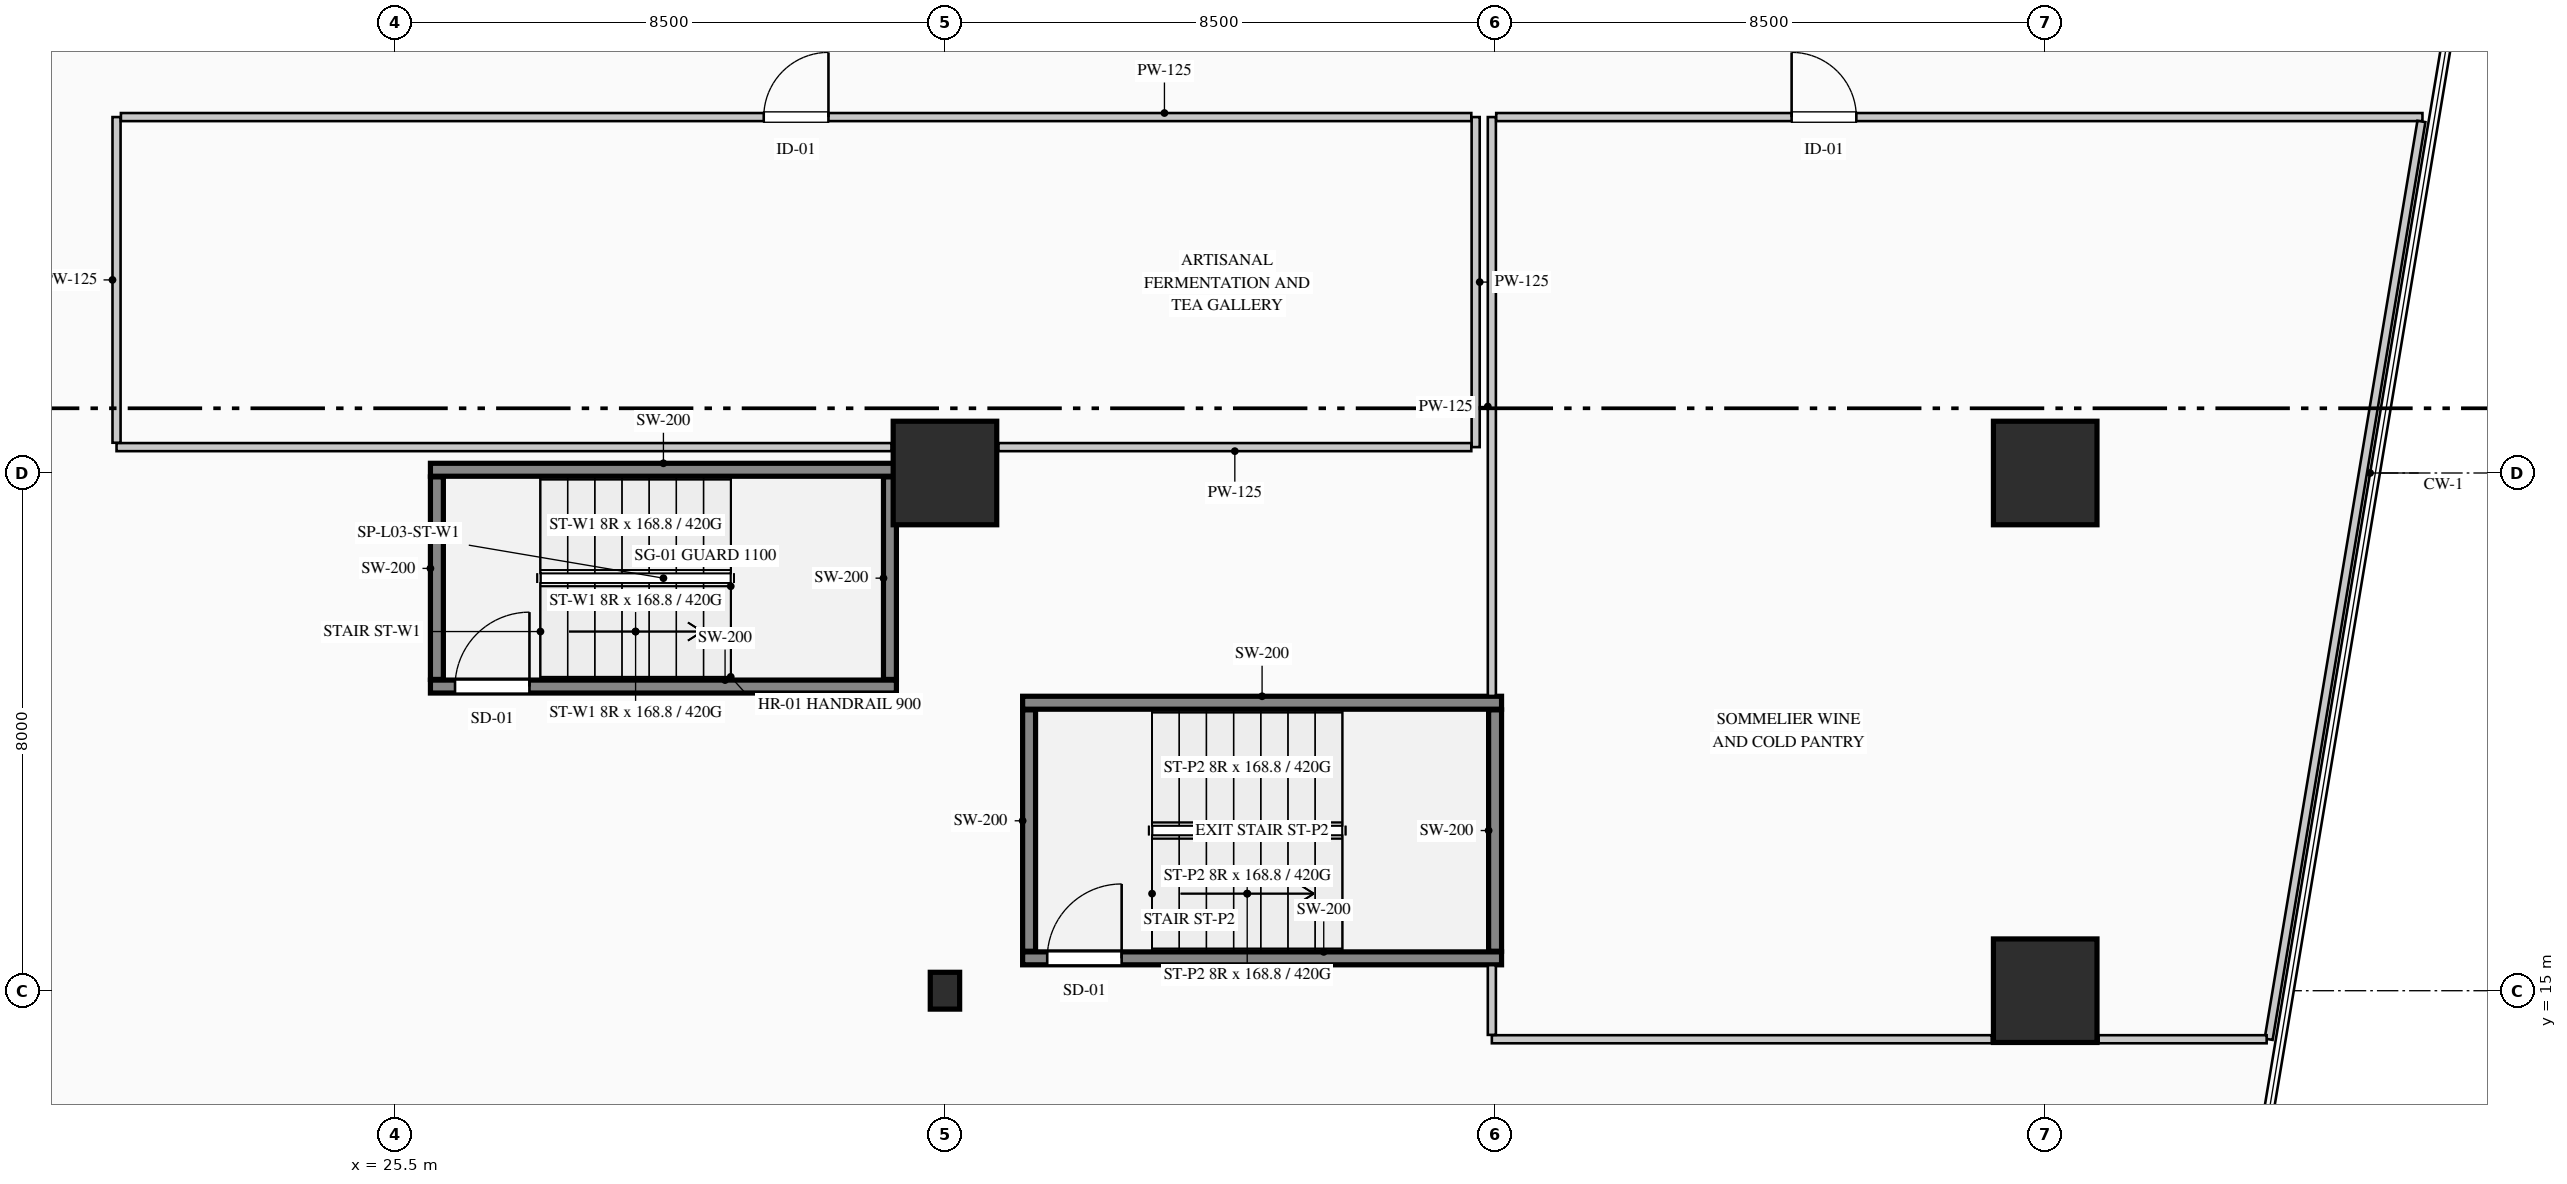
"""IFC4 building model, lengths in metres.
Left out: names, types, materials, properties, quantities, classifications, styles, units other than length and angle.
Written with IfcOpenShell. Run it as: python <this file> out.ifc"""

import sys

from ifc_helpers import new_model, si_unit, direction, frame, frame_2d, origin, origin_2d, place, context, subcontext, project, spatial, rectangle, i_section, extrude, element, fill, save


model = new_model("IFC4")
c1 = context("Model", 3, precision=1e-05, world=origin(), true_north=direction((0.0, 1.0)))
c2 = subcontext(c1, "Body", "Model", "MODEL_VIEW")
j1 = project(units=[si_unit("LENGTHUNIT", "METRE"), si_unit("PLANEANGLEUNIT", "RADIAN")], contexts=[c1])
p1 = place(None, origin())
s1 = spatial("IfcSite", under=j1, at=p1, CompositionType="ELEMENT")
p2 = place(p1, origin())
s2 = spatial("IfcBuilding", under=s1, at=p2, CompositionType="ELEMENT")
p3 = place(p2, frame((0.0, 0.0, 10.8)))
s3 = spatial("IfcBuildingStorey", under=s2, at=p3, CompositionType="ELEMENT", Elevation=10.8)
p4 = place(p3, frame((26.05, 19.7, 0.0), z_axis=(0.0, 0.0, 1.0), x_axis=(1.0, 0.0, 0.0)))
e1 = element("IfcWall", 1, at=p4, inside=s3, PredefinedType="SHEAR", context=c2, shape_type="SweptSolid", body=[
    extrude(rectangle(XDim=7.2, YDim=0.2, at=frame_2d((3.6, 0.0))), origin(), (0.0, 0.0, 1.0), 5.4),
])
p5 = place(p4, frame((0.38, 0.0, 0.0)))
e2 = element("IfcOpeningElement", 2, at=p5, cuts=e1, PredefinedType="OPENING", context=c2, shape_type="SweptSolid", body=[
    extrude(rectangle(XDim=1.15, YDim=2.2, at=frame_2d((0.575, 1.1))), frame((0.0, 0.11, 0.0), z_axis=(0.0, -1.0, 0.0), x_axis=(1.0, 0.0, 0.0)), (0.0, 0.0, 1.0), 0.22),
])
p6 = place(p3, frame((26.05, 23.05, 0.0), z_axis=(0.0, 0.0, 1.0), x_axis=(1.0, 0.0, 0.0)))
e3 = element("IfcWall", 3, at=p6, inside=s3, PredefinedType="SHEAR", context=c2, shape_type="SweptSolid", body=[
    extrude(rectangle(XDim=7.2, YDim=0.2, at=frame_2d((3.6, 0.0))), origin(), (0.0, 0.0, 1.0), 5.4),
])
for number, where, z_axis, x_axis in (
    (4, (26.15, 19.81, 0.0), (0.0, 0.0, 1.0), (0.0, 1.0, 0.0)),
    (5, (33.15, 19.81, 0.0), (0.0, 0.0, 1.0), (0.0, 1.0, 0.0)),
):
    element("IfcWall", number, at=place(p3, frame(where, z_axis=z_axis, x_axis=x_axis)), inside=s3, PredefinedType="SHEAR", context=c2, shape_type="SweptSolid", body=[
        extrude(rectangle(XDim=3.13, YDim=0.2, at=frame_2d((1.565, 0.0))), origin(), (0.0, 0.0, 1.0), 5.4),
    ])
p7 = place(p3, frame((35.2, 15.5, 0.0), z_axis=(0.0, 0.0, 1.0), x_axis=(1.0, 0.0, 0.0)))
e6 = element("IfcWall", 6, at=p7, inside=s3, PredefinedType="SHEAR", context=c2, shape_type="SweptSolid", body=[
    extrude(rectangle(XDim=7.4, YDim=0.2, at=frame_2d((3.7, 0.0))), origin(), (0.0, 0.0, 1.0), 5.4),
])
p8 = place(p7, frame((0.38, 0.0, 0.0)))
e7 = element("IfcOpeningElement", 7, at=p8, cuts=e6, PredefinedType="OPENING", context=c2, shape_type="SweptSolid", body=[
    extrude(rectangle(XDim=1.15, YDim=2.2, at=frame_2d((0.575, 1.1))), frame((0.0, 0.11, 0.0), z_axis=(0.0, -1.0, 0.0), x_axis=(1.0, 0.0, 0.0)), (0.0, 0.0, 1.0), 0.22),
])
p9 = place(p3, frame((35.2, 19.45, 0.0), z_axis=(0.0, 0.0, 1.0), x_axis=(1.0, 0.0, 0.0)))
e8 = element("IfcWall", 8, at=p9, inside=s3, PredefinedType="SHEAR", context=c2, shape_type="SweptSolid", body=[
    extrude(rectangle(XDim=7.4, YDim=0.2, at=frame_2d((3.7, 0.0))), origin(), (0.0, 0.0, 1.0), 5.4),
])
for number, where, z_axis, x_axis in (
    (9, (35.3, 15.61, 0.0), (0.0, 0.0, 1.0), (0.0, 1.0, 0.0)),
    (10, (42.5, 15.61, 0.0), (0.0, 0.0, 1.0), (0.0, 1.0, 0.0)),
):
    element("IfcWall", number, at=place(p3, frame(where, z_axis=z_axis, x_axis=x_axis)), inside=s3, PredefinedType="SHEAR", context=c2, shape_type="SweptSolid", body=[
        extrude(rectangle(XDim=3.73, YDim=0.2, at=frame_2d((1.865, 0.0))), origin(), (0.0, 0.0, 1.0), 5.4),
    ])
p10 = place(p3, frame((34.0, 15.0, 0.0), z_axis=(0.0, 0.0, 1.0), x_axis=(1.0, 0.0, 0.0)))
e11 = element("IfcColumn", 11, at=p10, inside=s3, PredefinedType="COLUMN", context=c2, shape_type="SweptSolid", body=[
    extrude(i_section(OverallWidth=0.454, OverallDepth=0.569, WebThickness=0.078, FlangeThickness=0.08, FilletRadius=0.015, at=origin_2d()), origin(), (0.0, 0.0, 1.0), 5.4),
])
for number, where, z_axis, x_axis in (
    (12, (34.0, 23.0, 0.0), (0.0, 0.0, 1.0), (1.0, 0.0, 0.0)),
    (13, (51.0, 15.0, 0.0), (0.0, 0.0, 1.0), (1.0, 0.0, 0.0)),
    (14, (51.0, 23.0, 0.0), (0.0, 0.0, 1.0), (1.0, 0.0, 0.0)),
):
    element("IfcColumn", number, at=place(p3, frame(where, z_axis=z_axis, x_axis=x_axis)), inside=s3, PredefinedType="COLUMN", context=c2, shape_type="SweptSolid", body=[
        extrude(rectangle(XDim=1.6, YDim=1.6, at=origin_2d()), origin(), (0.0, 0.0, 1.0), 5.4),
    ])
p11 = place(p3, frame((42.2, 28.5, 0.0), z_axis=(0.0, 0.0, 1.0), x_axis=(0.0, -1.0, 0.0)))
e15 = element("IfcWall", 15, at=p11, inside=s3, PredefinedType="PARTITIONING", context=c2, shape_type="SweptSolid", body=[
    extrude(rectangle(XDim=5.1, YDim=0.125, at=frame_2d((2.55, 0.0))), origin(), (0.0, 0.0, 1.0), 5.08),
])
p12 = place(p3, frame((42.133, 23.4, 0.0), z_axis=(0.0, 0.0, 1.0), x_axis=(-1.0, 0.0, 0.0)))
e16 = element("IfcWall", 16, at=p12, inside=s3, PredefinedType="PARTITIONING", context=c2, shape_type="SweptSolid", body=[
    extrude(rectangle(XDim=7.308, YDim=0.125, at=frame_2d((3.654, 0.0))), origin(), (0.0, 0.0, 1.0), 5.08),
])
p13 = place(p3, frame((33.175, 23.4, 0.0), z_axis=(0.0, 0.0, 1.0), x_axis=(-1.0, 0.0, 0.0)))
e17 = element("IfcWall", 17, at=p13, inside=s3, PredefinedType="PARTITIONING", context=c2, shape_type="SweptSolid", body=[
    extrude(rectangle(XDim=11.975, YDim=0.125, at=frame_2d((5.988, 0.0))), origin(), (0.0, 0.0, 1.0), 5.08),
])
p14 = place(p3, frame((21.2, 23.468, 0.0), z_axis=(0.0, 0.0, 1.0), x_axis=(0.0, 1.0, 0.0)))
e18 = element("IfcWall", 18, at=p14, inside=s3, PredefinedType="PARTITIONING", context=c2, shape_type="SweptSolid", body=[
    extrude(rectangle(XDim=5.032, YDim=0.125, at=frame_2d((2.516, 0.0))), origin(), (0.0, 0.0, 1.0), 5.08),
])
p15 = place(p3, frame((21.268, 28.5, 0.0), z_axis=(0.0, 0.0, 1.0), x_axis=(1.0, 0.0, 0.0)))
e19 = element("IfcWall", 19, at=p15, inside=s3, PredefinedType="PARTITIONING", context=c2, shape_type="SweptSolid", body=[
    extrude(rectangle(XDim=20.865, YDim=0.125, at=frame_2d((10.433, 0.0))), origin(), (0.0, 0.0, 1.0), 5.08),
])
p16 = place(p15, frame((9.933, 0.0, 0.0)))
e20 = element("IfcOpeningElement", 20, at=p16, cuts=e19, PredefinedType="OPENING", context=c2, shape_type="SweptSolid", body=[
    extrude(rectangle(XDim=1.0, YDim=2.15, at=frame_2d((0.5, 1.075))), frame((0.0, 0.073, 0.0), z_axis=(0.0, -1.0, 0.0), x_axis=(1.0, 0.0, 0.0)), (0.0, 0.0, 1.0), 0.145),
])
p17 = place(p3, frame((42.45, 19.555, 0.0), z_axis=(0.0, 0.0, 1.0), x_axis=(0.0, 1.0, 0.0)))
e21 = element("IfcWall", 21, at=p17, inside=s3, PredefinedType="PARTITIONING", context=c2, shape_type="SweptSolid", body=[
    extrude(rectangle(XDim=8.945, YDim=0.125, at=frame_2d((4.473, 0.0))), origin(), (0.0, 0.0, 1.0), 5.08),
])
p18 = place(p3, frame((42.518, 28.5, 0.0), z_axis=(0.0, 0.0, 1.0), x_axis=(1.0, 0.0, 0.0)))
e22 = element("IfcWall", 22, at=p18, inside=s3, PredefinedType="PARTITIONING", context=c2, shape_type="SweptSolid", body=[
    extrude(rectangle(XDim=14.311, YDim=0.125, at=frame_2d((7.156, 0.0))), origin(), (0.0, 0.0, 1.0), 5.08),
])
p19 = place(p18, frame((4.564, 0.0, 0.0)))
e23 = element("IfcOpeningElement", 23, at=p19, cuts=e22, PredefinedType="OPENING", context=c2, shape_type="SweptSolid", body=[
    extrude(rectangle(XDim=1.0, YDim=2.15, at=frame_2d((0.5, 1.075))), frame((0.0, 0.073, 0.0), z_axis=(0.0, -1.0, 0.0), x_axis=(1.0, 0.0, 0.0)), (0.0, 0.0, 1.0), 0.145),
])
p20 = place(p3, frame((56.813, 28.433, 0.0), z_axis=(0.0, 0.0, 1.0), x_axis=(-0.16420072603, -0.9864269469, 0.0)))
e24 = element("IfcWall", 24, at=p20, inside=s3, PredefinedType="PARTITIONING", context=c2, shape_type="SweptSolid", body=[
    extrude(rectangle(XDim=14.378, YDim=0.125, at=frame_2d((7.189, 0.0))), origin(), (0.0, 0.0, 1.0), 5.08),
])
p21 = place(p3, frame((54.421, 14.25, 0.0), z_axis=(0.0, 0.0, 1.0), x_axis=(-1.0, 0.0, 0.0)))
e25 = element("IfcWall", 25, at=p21, inside=s3, PredefinedType="PARTITIONING", context=c2, shape_type="SweptSolid", body=[
    extrude(rectangle(XDim=2.596, YDim=0.125, at=frame_2d((1.298, 0.0))), origin(), (0.0, 0.0, 1.0), 5.08),
])
p22 = place(p3, frame((50.175, 14.25, 0.0), z_axis=(0.0, 0.0, 1.0), x_axis=(-1.0, 0.0, 0.0)))
e26 = element("IfcWall", 26, at=p22, inside=s3, PredefinedType="PARTITIONING", context=c2, shape_type="SweptSolid", body=[
    extrude(rectangle(XDim=7.725, YDim=0.125, at=frame_2d((3.863, 0.0))), origin(), (0.0, 0.0, 1.0), 5.08),
])
p23 = place(p3, frame((42.45, 14.317, 0.0), z_axis=(0.0, 0.0, 1.0), x_axis=(0.0, 1.0, 0.0)))
e27 = element("IfcWall", 27, at=p23, inside=s3, PredefinedType="PARTITIONING", context=c2, shape_type="SweptSolid", body=[
    extrude(rectangle(XDim=1.078, YDim=0.125, at=frame_2d((0.539, 0.0))), origin(), (0.0, 0.0, 1.0), 5.08),
])
p24 = place(p5, origin())
e28 = element("IfcDoor", 28, at=p24, inside=s3, OperationType="SINGLE_SWING_RIGHT", PredefinedType="DOOR", context=c2, shape_type="SweptSolid", body=[
    extrude(rectangle(XDim=1.15, YDim=2.2, at=frame_2d((0.575, 1.1))), frame((0.0, 0.025, 0.0), z_axis=(0.0, -1.0, 0.0), x_axis=(1.0, 0.0, 0.0)), (0.0, 0.0, 1.0), 0.05),
])
fill(e2, e28)
p25 = place(p8, origin())
e29 = element("IfcDoor", 29, at=p25, inside=s3, OperationType="SINGLE_SWING_RIGHT", PredefinedType="DOOR", context=c2, shape_type="SweptSolid", body=[
    extrude(rectangle(XDim=1.15, YDim=2.2, at=frame_2d((0.575, 1.1))), frame((0.0, 0.025, 0.0), z_axis=(0.0, -1.0, 0.0), x_axis=(1.0, 0.0, 0.0)), (0.0, 0.0, 1.0), 0.05),
])
fill(e7, e29)
p26 = place(p16, origin())
e30 = element("IfcDoor", 30, at=p26, inside=s3, OperationType="SINGLE_SWING_RIGHT", PredefinedType="DOOR", context=c2, shape_type="SweptSolid", body=[
    extrude(rectangle(XDim=1.0, YDim=2.15, at=frame_2d((0.5, 1.075))), frame((0.0, 0.025, 0.0), z_axis=(0.0, -1.0, 0.0), x_axis=(1.0, 0.0, 0.0)), (0.0, 0.0, 1.0), 0.05),
])
fill(e20, e30)
p27 = place(p19, origin())
e31 = element("IfcDoor", 31, at=p27, inside=s3, OperationType="SINGLE_SWING_LEFT", PredefinedType="DOOR", context=c2, shape_type="SweptSolid", body=[
    extrude(rectangle(XDim=1.0, YDim=2.15, at=frame_2d((0.5, 1.075))), frame((0.0, 0.025, 0.0), z_axis=(0.0, -1.0, 0.0), x_axis=(1.0, 0.0, 0.0)), (0.0, 0.0, 1.0), 0.05),
])
fill(e23, e31)
save(model, sys.argv[1])
